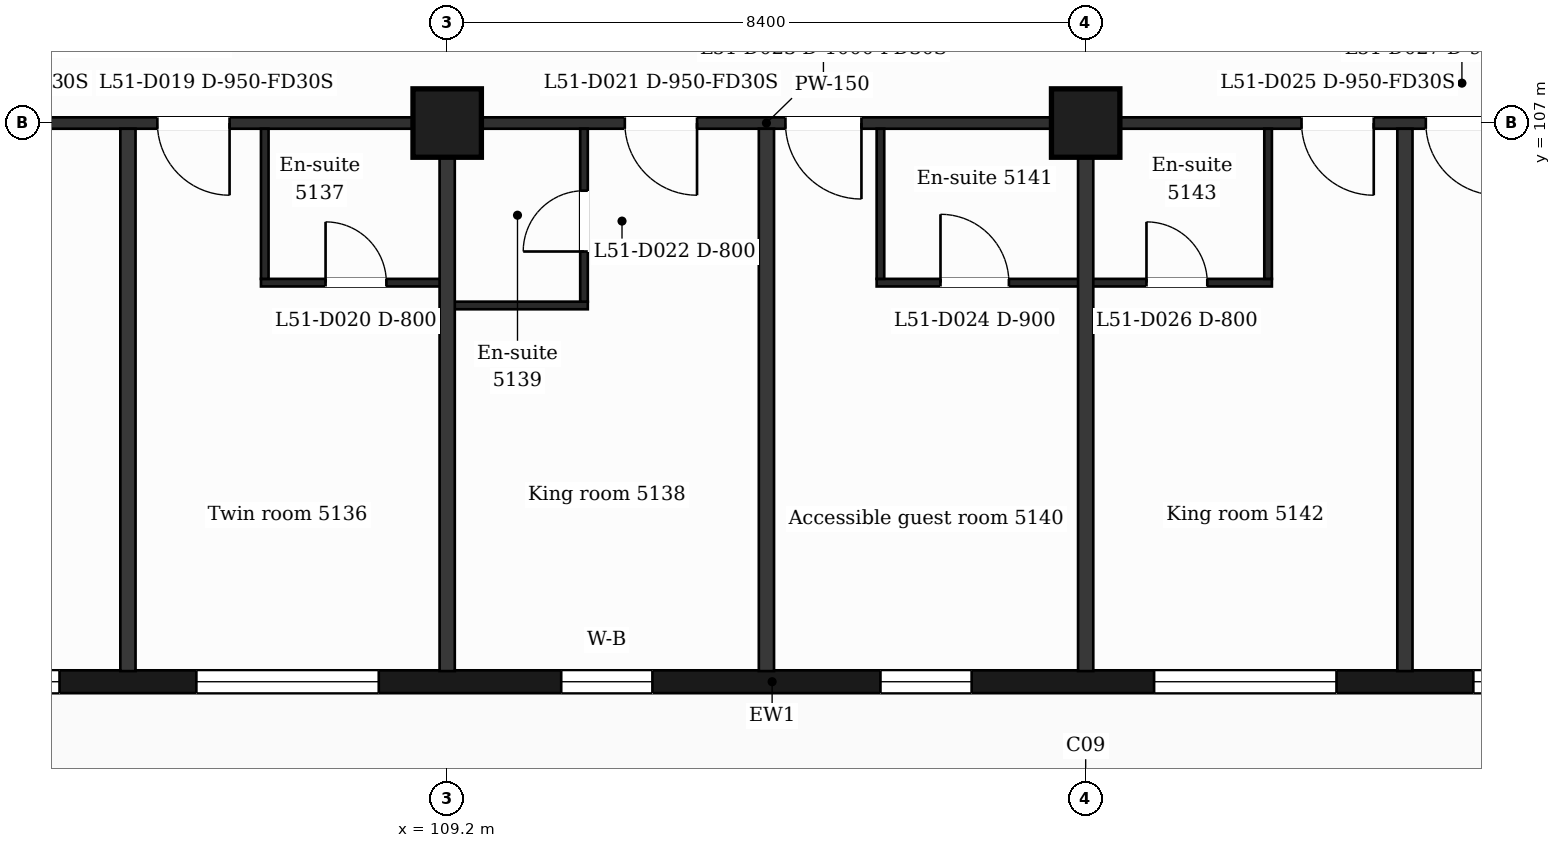
"""IFC4 building model, lengths in metres.
Left out: names, types, materials, properties, quantities, classifications, styles, units other than length and angle.
Written with IfcOpenShell. Run it as: python <this file> out.ifc"""

import sys

from ifc_helpers import new_model, si_unit, direction, frame, frame_2d, origin, origin_2d, place, context, subcontext, project, spatial, rectangle, extrude, element, fill, save


model = new_model("IFC4")
c1 = context("Model", 3, precision=1e-05, world=origin(), true_north=direction((0.0, 1.0)))
c2 = subcontext(c1, "Body", "Model", "MODEL_VIEW")
j1 = project(units=[si_unit("LENGTHUNIT", "METRE"), si_unit("PLANEANGLEUNIT", "RADIAN")], contexts=[c1])
p1 = place(None, origin())
s1 = spatial("IfcSite", under=j1, at=p1, CompositionType="ELEMENT")
p2 = place(p1, origin())
s2 = spatial("IfcBuilding", under=s1, at=p2, CompositionType="ELEMENT")
p3 = place(p2, frame((0.0, 0.0, 213.3)))
s3 = spatial("IfcBuildingStorey", under=s2, at=p3, CompositionType="ELEMENT", Elevation=213.3)
for number, where, z_axis, x_axis in (
    (1, (109.2, 107.0, 0.0), (0.0, 0.0, 1.0), (1.0, 0.0, 0.0)),
    (2, (117.6, 107.0, 0.0), (0.0, 0.0, 1.0), (1.0, 0.0, 0.0)),
):
    element("IfcColumn", number, at=place(p3, frame(where, z_axis=z_axis, x_axis=x_axis)), inside=s3, PredefinedType="COLUMN", context=c2, shape_type="SweptSolid", body=[
        extrude(rectangle(XDim=0.9, YDim=0.9, at=origin_2d()), origin(), (0.0, 0.0, 1.0), 3.7),
    ])
p4 = place(p3, frame((89.85, 99.65, 0.0), z_axis=(0.0, 0.0, 1.0), x_axis=(1.0, 0.0, 0.0)))
e3 = element("IfcWall", 3, at=p4, inside=s3, PredefinedType="SOLIDWALL", context=c2, shape_type="SweptSolid", body=[
    extrude(rectangle(XDim=47.25, YDim=0.3, at=frame_2d((23.625, 0.0))), origin(), (0.0, 0.0, 1.0), 3.38),
])
p5 = place(p4, frame((0.725, 0.0, 0.9)))
e4 = element("IfcOpeningElement", 4, at=p5, cuts=e3, PredefinedType="OPENING", context=c2, shape_type="SweptSolid", body=[
    extrude(rectangle(XDim=1.2, YDim=2.1, at=frame_2d((0.6, 1.05))), frame((0.0, 0.16, 0.0), z_axis=(0.0, -1.0, 0.0), x_axis=(1.0, 0.0, 0.0)), (0.0, 0.0, 1.0), 0.32),
])
p6 = place(p4, frame((3.45, 0.0, 0.9)))
e5 = element("IfcOpeningElement", 5, at=p6, cuts=e3, PredefinedType="OPENING", context=c2, shape_type="SweptSolid", body=[
    extrude(rectangle(XDim=2.4, YDim=2.1, at=frame_2d((1.2, 1.05))), frame((0.0, 0.16, 0.0), z_axis=(0.0, -1.0, 0.0), x_axis=(1.0, 0.0, 0.0)), (0.0, 0.0, 1.0), 0.32),
])
p7 = place(p4, frame((7.35, 0.0, 0.0)))
e6 = element("IfcOpeningElement", 6, at=p7, cuts=e3, PredefinedType="OPENING", context=c2, shape_type="SweptSolid", body=[
    extrude(rectangle(XDim=1.2, YDim=2.4, at=frame_2d((0.6, 1.2))), frame((0.0, 0.16, 0.0), z_axis=(0.0, -1.0, 0.0), x_axis=(1.0, 0.0, 0.0)), (0.0, 0.0, 1.0), 0.32),
])
p8 = place(p4, frame((9.15, 0.0, 0.9)))
e7 = element("IfcOpeningElement", 7, at=p8, cuts=e3, PredefinedType="OPENING", context=c2, shape_type="SweptSolid", body=[
    extrude(rectangle(XDim=1.2, YDim=2.1, at=frame_2d((0.6, 1.05))), frame((0.0, 0.16, 0.0), z_axis=(0.0, -1.0, 0.0), x_axis=(1.0, 0.0, 0.0)), (0.0, 0.0, 1.0), 0.32),
])
p9 = place(p4, frame((11.85, 0.0, 0.9)))
e8 = element("IfcOpeningElement", 8, at=p9, cuts=e3, PredefinedType="OPENING", context=c2, shape_type="SweptSolid", body=[
    extrude(rectangle(XDim=2.4, YDim=2.1, at=frame_2d((1.2, 1.05))), frame((0.0, 0.16, 0.0), z_axis=(0.0, -1.0, 0.0), x_axis=(1.0, 0.0, 0.0)), (0.0, 0.0, 1.0), 0.32),
])
p10 = place(p4, frame((16.05, 0.0, 0.9)))
e9 = element("IfcOpeningElement", 9, at=p10, cuts=e3, PredefinedType="OPENING", context=c2, shape_type="SweptSolid", body=[
    extrude(rectangle(XDim=2.4, YDim=2.1, at=frame_2d((1.2, 1.05))), frame((0.0, 0.16, 0.0), z_axis=(0.0, -1.0, 0.0), x_axis=(1.0, 0.0, 0.0)), (0.0, 0.0, 1.0), 0.32),
])
p11 = place(p4, frame((20.85, 0.0, 0.9)))
e10 = element("IfcOpeningElement", 10, at=p11, cuts=e3, PredefinedType="OPENING", context=c2, shape_type="SweptSolid", body=[
    extrude(rectangle(XDim=1.2, YDim=2.1, at=frame_2d((0.6, 1.05))), frame((0.0, 0.16, 0.0), z_axis=(0.0, -1.0, 0.0), x_axis=(1.0, 0.0, 0.0)), (0.0, 0.0, 1.0), 0.32),
])
p12 = place(p4, frame((25.05, 0.0, 0.9)))
e11 = element("IfcOpeningElement", 11, at=p12, cuts=e3, PredefinedType="OPENING", context=c2, shape_type="SweptSolid", body=[
    extrude(rectangle(XDim=1.2, YDim=2.1, at=frame_2d((0.6, 1.05))), frame((0.0, 0.16, 0.0), z_axis=(0.0, -1.0, 0.0), x_axis=(1.0, 0.0, 0.0)), (0.0, 0.0, 1.0), 0.32),
])
p13 = place(p4, frame((28.65, 0.0, 0.9)))
e12 = element("IfcOpeningElement", 12, at=p13, cuts=e3, PredefinedType="OPENING", context=c2, shape_type="SweptSolid", body=[
    extrude(rectangle(XDim=2.4, YDim=2.1, at=frame_2d((1.2, 1.05))), frame((0.0, 0.16, 0.0), z_axis=(0.0, -1.0, 0.0), x_axis=(1.0, 0.0, 0.0)), (0.0, 0.0, 1.0), 0.32),
])
p14 = place(p4, frame((32.85, 0.0, 0.9)))
e13 = element("IfcOpeningElement", 13, at=p14, cuts=e3, PredefinedType="OPENING", context=c2, shape_type="SweptSolid", body=[
    extrude(rectangle(XDim=2.4, YDim=2.1, at=frame_2d((1.2, 1.05))), frame((0.0, 0.16, 0.0), z_axis=(0.0, -1.0, 0.0), x_axis=(1.0, 0.0, 0.0)), (0.0, 0.0, 1.0), 0.32),
])
p15 = place(p4, frame((37.05, 0.0, 0.9)))
e14 = element("IfcOpeningElement", 14, at=p15, cuts=e3, PredefinedType="OPENING", context=c2, shape_type="SweptSolid", body=[
    extrude(rectangle(XDim=2.4, YDim=2.1, at=frame_2d((1.2, 1.05))), frame((0.0, 0.16, 0.0), z_axis=(0.0, -1.0, 0.0), x_axis=(1.0, 0.0, 0.0)), (0.0, 0.0, 1.0), 0.32),
])
p16 = place(p4, frame((41.25, 0.0, 0.9)))
e15 = element("IfcOpeningElement", 15, at=p16, cuts=e3, PredefinedType="OPENING", context=c2, shape_type="SweptSolid", body=[
    extrude(rectangle(XDim=2.4, YDim=2.1, at=frame_2d((1.2, 1.05))), frame((0.0, 0.16, 0.0), z_axis=(0.0, -1.0, 0.0), x_axis=(1.0, 0.0, 0.0)), (0.0, 0.0, 1.0), 0.32),
])
p17 = place(p4, frame((45.25, 0.0, 0.9)))
e16 = element("IfcOpeningElement", 16, at=p17, cuts=e3, PredefinedType="OPENING", context=c2, shape_type="SweptSolid", body=[
    extrude(rectangle(XDim=1.2, YDim=2.1, at=frame_2d((0.6, 1.05))), frame((0.0, 0.16, 0.0), z_axis=(0.0, -1.0, 0.0), x_axis=(1.0, 0.0, 0.0)), (0.0, 0.0, 1.0), 0.32),
])
p18 = place(p3, frame((109.2, 104.6, 0.0), z_axis=(0.0, 0.0, 1.0), x_axis=(1.0, 0.0, 0.0)))
e17 = element("IfcWall", 17, at=p18, inside=s3, PredefinedType="PARTITIONING", context=c2, shape_type="SweptSolid", body=[
    extrude(rectangle(XDim=1.85, YDim=0.1, at=frame_2d((0.925, 0.0))), origin(), (0.0, 0.0, 1.0), 3.38),
])
p19 = place(p3, frame((106.75, 104.9, 0.0), z_axis=(0.0, 0.0, 1.0), x_axis=(1.0, 0.0, 0.0)))
e18 = element("IfcWall", 18, at=p19, inside=s3, PredefinedType="PARTITIONING", context=c2, shape_type="SweptSolid", body=[
    extrude(rectangle(XDim=2.45, YDim=0.1, at=frame_2d((1.225, 0.0))), origin(), (0.0, 0.0, 1.0), 3.38),
])
p20 = place(p19, frame((0.85, 0.0, 0.0)))
e19 = element("IfcOpeningElement", 19, at=p20, cuts=e18, PredefinedType="OPENING", context=c2, shape_type="SweptSolid", body=[
    extrude(rectangle(XDim=0.8, YDim=2.1, at=frame_2d((0.4, 1.05))), frame((0.0, 0.06, 0.0), z_axis=(0.0, -1.0, 0.0), x_axis=(1.0, 0.0, 0.0)), (0.0, 0.0, 1.0), 0.12),
])
p21 = place(p3, frame((114.85, 104.9, 0.0), z_axis=(0.0, 0.0, 1.0), x_axis=(1.0, 0.0, 0.0)))
e20 = element("IfcWall", 20, at=p21, inside=s3, PredefinedType="PARTITIONING", context=c2, shape_type="SweptSolid", body=[
    extrude(rectangle(XDim=5.2, YDim=0.1, at=frame_2d((2.6, 0.0))), origin(), (0.0, 0.0, 1.0), 3.38),
])
p22 = place(p21, frame((0.84, 0.0, 0.0)))
e21 = element("IfcOpeningElement", 21, at=p22, cuts=e20, PredefinedType="OPENING", context=c2, shape_type="SweptSolid", body=[
    extrude(rectangle(XDim=0.9, YDim=2.1, at=frame_2d((0.45, 1.05))), frame((0.0, 0.06, 0.0), z_axis=(0.0, -1.0, 0.0), x_axis=(1.0, 0.0, 0.0)), (0.0, 0.0, 1.0), 0.12),
])
p23 = place(p21, frame((3.55, 0.0, 0.0)))
e22 = element("IfcOpeningElement", 22, at=p23, cuts=e20, PredefinedType="OPENING", context=c2, shape_type="SweptSolid", body=[
    extrude(rectangle(XDim=0.8, YDim=2.1, at=frame_2d((0.4, 1.05))), frame((0.0, 0.06, 0.0), z_axis=(0.0, -1.0, 0.0), x_axis=(1.0, 0.0, 0.0)), (0.0, 0.0, 1.0), 0.12),
])
p24 = place(p3, frame((87.018, 107.0, 0.0), z_axis=(0.0, 0.0, 1.0), x_axis=(1.0, 0.0, 0.0)))
e23 = element("IfcWall", 23, at=p24, inside=s3, PredefinedType="PARTITIONING", context=c2, shape_type="SweptSolid", body=[
    extrude(rectangle(XDim=52.765, YDim=0.15, at=frame_2d((26.382, 0.0))), origin(), (0.0, 0.0, 1.0), 3.38),
])
p25 = place(p24, frame((1.276, 0.0, 0.0)))
e24 = element("IfcOpeningElement", 24, at=p25, cuts=e23, PredefinedType="OPENING", context=c2, shape_type="SweptSolid", body=[
    extrude(rectangle(XDim=0.95, YDim=2.1, at=frame_2d((0.475, 1.05))), frame((0.0, 0.085, 0.0), z_axis=(0.0, -1.0, 0.0), x_axis=(1.0, 0.0, 0.0)), (0.0, 0.0, 1.0), 0.17),
])
p26 = place(p24, frame((6.034, 0.0, 0.0)))
e25 = element("IfcOpeningElement", 25, at=p26, cuts=e23, PredefinedType="OPENING", context=c2, shape_type="SweptSolid", body=[
    extrude(rectangle(XDim=0.95, YDim=2.1, at=frame_2d((0.475, 1.05))), frame((0.0, 0.085, 0.0), z_axis=(0.0, -1.0, 0.0), x_axis=(1.0, 0.0, 0.0)), (0.0, 0.0, 1.0), 0.17),
])
p27 = place(p24, frame((15.445, 0.0, 0.0)))
e26 = element("IfcOpeningElement", 26, at=p27, cuts=e23, PredefinedType="OPENING", context=c2, shape_type="SweptSolid", body=[
    extrude(rectangle(XDim=0.95, YDim=2.1, at=frame_2d((0.475, 1.05))), frame((0.0, 0.085, 0.0), z_axis=(0.0, -1.0, 0.0), x_axis=(1.0, 0.0, 0.0)), (0.0, 0.0, 1.0), 0.17),
])
p28 = place(p24, frame((18.369, 0.0, 0.0)))
e27 = element("IfcOpeningElement", 27, at=p28, cuts=e23, PredefinedType="OPENING", context=c2, shape_type="SweptSolid", body=[
    extrude(rectangle(XDim=0.95, YDim=2.1, at=frame_2d((0.475, 1.05))), frame((0.0, 0.085, 0.0), z_axis=(0.0, -1.0, 0.0), x_axis=(1.0, 0.0, 0.0)), (0.0, 0.0, 1.0), 0.17),
])
p29 = place(p24, frame((24.519, 0.0, 0.0)))
e28 = element("IfcOpeningElement", 28, at=p29, cuts=e23, PredefinedType="OPENING", context=c2, shape_type="SweptSolid", body=[
    extrude(rectangle(XDim=0.95, YDim=2.1, at=frame_2d((0.475, 1.05))), frame((0.0, 0.085, 0.0), z_axis=(0.0, -1.0, 0.0), x_axis=(1.0, 0.0, 0.0)), (0.0, 0.0, 1.0), 0.17),
])
p30 = place(p24, frame((26.632, 0.0, 0.0)))
e29 = element("IfcOpeningElement", 29, at=p30, cuts=e23, PredefinedType="OPENING", context=c2, shape_type="SweptSolid", body=[
    extrude(rectangle(XDim=1.0, YDim=2.1, at=frame_2d((0.5, 1.05))), frame((0.0, 0.085, 0.0), z_axis=(0.0, -1.0, 0.0), x_axis=(1.0, 0.0, 0.0)), (0.0, 0.0, 1.0), 0.17),
])
p31 = place(p24, frame((33.422, 0.0, 0.0)))
e30 = element("IfcOpeningElement", 30, at=p31, cuts=e23, PredefinedType="OPENING", context=c2, shape_type="SweptSolid", body=[
    extrude(rectangle(XDim=0.95, YDim=2.1, at=frame_2d((0.475, 1.05))), frame((0.0, 0.085, 0.0), z_axis=(0.0, -1.0, 0.0), x_axis=(1.0, 0.0, 0.0)), (0.0, 0.0, 1.0), 0.17),
])
p32 = place(p24, frame((35.057, 0.0, 0.0)))
e31 = element("IfcOpeningElement", 31, at=p32, cuts=e23, PredefinedType="OPENING", context=c2, shape_type="SweptSolid", body=[
    extrude(rectangle(XDim=0.95, YDim=2.1, at=frame_2d((0.475, 1.05))), frame((0.0, 0.085, 0.0), z_axis=(0.0, -1.0, 0.0), x_axis=(1.0, 0.0, 0.0)), (0.0, 0.0, 1.0), 0.17),
])
p33 = place(p24, frame((44.532, 0.0, 0.0)))
e32 = element("IfcOpeningElement", 32, at=p33, cuts=e23, PredefinedType="OPENING", context=c2, shape_type="SweptSolid", body=[
    extrude(rectangle(XDim=1.0, YDim=2.1, at=frame_2d((0.5, 1.05))), frame((0.0, 0.085, 0.0), z_axis=(0.0, -1.0, 0.0), x_axis=(1.0, 0.0, 0.0)), (0.0, 0.0, 1.0), 0.17),
])
p34 = place(p24, frame((48.249, 0.0, 0.0)))
e33 = element("IfcOpeningElement", 33, at=p34, cuts=e23, PredefinedType="OPENING", context=c2, shape_type="SweptSolid", body=[
    extrude(rectangle(XDim=0.95, YDim=2.1, at=frame_2d((0.475, 1.05))), frame((0.0, 0.085, 0.0), z_axis=(0.0, -1.0, 0.0), x_axis=(1.0, 0.0, 0.0)), (0.0, 0.0, 1.0), 0.17),
])
p35 = place(p3, frame((105.0, 99.79, 0.0), z_axis=(0.0, 0.0, 1.0), x_axis=(0.0, 1.0, 0.0)))
e34 = element("IfcWall", 34, at=p35, inside=s3, PredefinedType="PARTITIONING", context=c2, shape_type="SweptSolid", body=[
    extrude(rectangle(XDim=7.135, YDim=0.2, at=frame_2d((3.567, 0.0))), origin(), (0.0, 0.0, 1.0), 3.38),
])
p36 = place(p3, frame((106.8, 104.95, 0.0), z_axis=(0.0, 0.0, 1.0), x_axis=(0.0, 1.0, 0.0)))
e35 = element("IfcWall", 35, at=p36, inside=s3, PredefinedType="PARTITIONING", context=c2, shape_type="SweptSolid", body=[
    extrude(rectangle(XDim=1.975, YDim=0.1, at=frame_2d((0.988, 0.0))), origin(), (0.0, 0.0, 1.0), 3.38),
])
p37 = place(p3, frame((109.2, 99.79, 0.0), z_axis=(0.0, 0.0, 1.0), x_axis=(0.0, 1.0, 0.0)))
e36 = element("IfcWall", 36, at=p37, inside=s3, PredefinedType="PARTITIONING", context=c2, shape_type="SweptSolid", body=[
    extrude(rectangle(XDim=7.135, YDim=0.2, at=frame_2d((3.567, 0.0))), origin(), (0.0, 0.0, 1.0), 3.38),
])
p38 = place(p3, frame((111.0, 104.65, 0.0), z_axis=(0.0, 0.0, 1.0), x_axis=(0.0, 1.0, 0.0)))
e37 = element("IfcWall", 37, at=p38, inside=s3, PredefinedType="PARTITIONING", context=c2, shape_type="SweptSolid", body=[
    extrude(rectangle(XDim=2.275, YDim=0.1, at=frame_2d((1.138, 0.0))), origin(), (0.0, 0.0, 1.0), 3.38),
])
p39 = place(p38, frame((0.66, 0.0, 0.0)))
e38 = element("IfcOpeningElement", 38, at=p39, cuts=e37, PredefinedType="OPENING", context=c2, shape_type="SweptSolid", body=[
    extrude(rectangle(XDim=0.8, YDim=2.1, at=frame_2d((0.4, 1.05))), frame((0.0, 0.06, 0.0), z_axis=(0.0, -1.0, 0.0), x_axis=(1.0, 0.0, 0.0)), (0.0, 0.0, 1.0), 0.12),
])
p40 = place(p3, frame((113.4, 99.79, 0.0), z_axis=(0.0, 0.0, 1.0), x_axis=(0.0, 1.0, 0.0)))
e39 = element("IfcWall", 39, at=p40, inside=s3, PredefinedType="PARTITIONING", context=c2, shape_type="SweptSolid", body=[
    extrude(rectangle(XDim=7.135, YDim=0.2, at=frame_2d((3.567, 0.0))), origin(), (0.0, 0.0, 1.0), 3.38),
])
p41 = place(p3, frame((114.9, 104.95, 0.0), z_axis=(0.0, 0.0, 1.0), x_axis=(0.0, 1.0, 0.0)))
e40 = element("IfcWall", 40, at=p41, inside=s3, PredefinedType="PARTITIONING", context=c2, shape_type="SweptSolid", body=[
    extrude(rectangle(XDim=1.975, YDim=0.1, at=frame_2d((0.988, 0.0))), origin(), (0.0, 0.0, 1.0), 3.38),
])
p42 = place(p3, frame((117.6, 99.79, 0.0), z_axis=(0.0, 0.0, 1.0), x_axis=(0.0, 1.0, 0.0)))
e41 = element("IfcWall", 41, at=p42, inside=s3, PredefinedType="PARTITIONING", context=c2, shape_type="SweptSolid", body=[
    extrude(rectangle(XDim=7.135, YDim=0.2, at=frame_2d((3.567, 0.0))), origin(), (0.0, 0.0, 1.0), 3.38),
])
p43 = place(p3, frame((120.0, 104.95, 0.0), z_axis=(0.0, 0.0, 1.0), x_axis=(0.0, 1.0, 0.0)))
e42 = element("IfcWall", 42, at=p43, inside=s3, PredefinedType="PARTITIONING", context=c2, shape_type="SweptSolid", body=[
    extrude(rectangle(XDim=1.975, YDim=0.1, at=frame_2d((0.988, 0.0))), origin(), (0.0, 0.0, 1.0), 3.38),
])
p44 = place(p3, frame((121.8, 99.79, 0.0), z_axis=(0.0, 0.0, 1.0), x_axis=(0.0, 1.0, 0.0)))
e43 = element("IfcWall", 43, at=p44, inside=s3, PredefinedType="PARTITIONING", context=c2, shape_type="SweptSolid", body=[
    extrude(rectangle(XDim=7.135, YDim=0.2, at=frame_2d((3.567, 0.0))), origin(), (0.0, 0.0, 1.0), 3.38),
])
p45 = place(p9, origin())
e44 = element("IfcWindow", 44, at=p45, inside=s3, PartitioningType="SINGLE_PANEL", PredefinedType="WINDOW", context=c2, shape_type="SweptSolid", body=[
    extrude(rectangle(XDim=2.4, YDim=2.1, at=frame_2d((1.2, 1.05))), frame((0.0, 0.03, 0.0), z_axis=(0.0, -1.0, 0.0), x_axis=(1.0, 0.0, 0.0)), (0.0, 0.0, 1.0), 0.06),
])
fill(e8, e44)
p46 = place(p10, origin())
e45 = element("IfcWindow", 45, at=p46, inside=s3, PartitioningType="SINGLE_PANEL", PredefinedType="WINDOW", context=c2, shape_type="SweptSolid", body=[
    extrude(rectangle(XDim=2.4, YDim=2.1, at=frame_2d((1.2, 1.05))), frame((0.0, 0.03, 0.0), z_axis=(0.0, -1.0, 0.0), x_axis=(1.0, 0.0, 0.0)), (0.0, 0.0, 1.0), 0.06),
])
fill(e9, e45)
p47 = place(p11, origin())
e46 = element("IfcWindow", 46, at=p47, inside=s3, PartitioningType="SINGLE_PANEL", PredefinedType="WINDOW", context=c2, shape_type="SweptSolid", body=[
    extrude(rectangle(XDim=1.2, YDim=2.1, at=frame_2d((0.6, 1.05))), frame((0.0, 0.03, 0.0), z_axis=(0.0, -1.0, 0.0), x_axis=(1.0, 0.0, 0.0)), (0.0, 0.0, 1.0), 0.06),
])
fill(e10, e46)
p48 = place(p12, origin())
e47 = element("IfcWindow", 47, at=p48, inside=s3, PartitioningType="SINGLE_PANEL", PredefinedType="WINDOW", context=c2, shape_type="SweptSolid", body=[
    extrude(rectangle(XDim=1.2, YDim=2.1, at=frame_2d((0.6, 1.05))), frame((0.0, 0.03, 0.0), z_axis=(0.0, -1.0, 0.0), x_axis=(1.0, 0.0, 0.0)), (0.0, 0.0, 1.0), 0.06),
])
fill(e11, e47)
p49 = place(p13, origin())
e48 = element("IfcWindow", 48, at=p49, inside=s3, PartitioningType="SINGLE_PANEL", PredefinedType="WINDOW", context=c2, shape_type="SweptSolid", body=[
    extrude(rectangle(XDim=2.4, YDim=2.1, at=frame_2d((1.2, 1.05))), frame((0.0, 0.03, 0.0), z_axis=(0.0, -1.0, 0.0), x_axis=(1.0, 0.0, 0.0)), (0.0, 0.0, 1.0), 0.06),
])
fill(e12, e48)
p50 = place(p14, origin())
e49 = element("IfcWindow", 49, at=p50, inside=s3, PartitioningType="SINGLE_PANEL", PredefinedType="WINDOW", context=c2, shape_type="SweptSolid", body=[
    extrude(rectangle(XDim=2.4, YDim=2.1, at=frame_2d((1.2, 1.05))), frame((0.0, 0.03, 0.0), z_axis=(0.0, -1.0, 0.0), x_axis=(1.0, 0.0, 0.0)), (0.0, 0.0, 1.0), 0.06),
])
fill(e13, e49)
p51 = place(p28, origin())
e50 = element("IfcDoor", 50, at=p51, inside=s3, OperationType="SINGLE_SWING_RIGHT", PredefinedType="DOOR", context=c2, shape_type="SweptSolid", body=[
    extrude(rectangle(XDim=0.95, YDim=2.1, at=frame_2d((0.475, 1.05))), frame((0.0, 0.025, 0.0), z_axis=(0.0, -1.0, 0.0), x_axis=(1.0, 0.0, 0.0)), (0.0, 0.0, 1.0), 0.05),
])
fill(e27, e50)
p52 = place(p20, origin())
e51 = element("IfcDoor", 51, at=p52, inside=s3, OperationType="SINGLE_SWING_LEFT", PredefinedType="DOOR", context=c2, shape_type="SweptSolid", body=[
    extrude(rectangle(XDim=0.8, YDim=2.1, at=frame_2d((0.4, 1.05))), frame((0.0, 0.025, 0.0), z_axis=(0.0, -1.0, 0.0), x_axis=(1.0, 0.0, 0.0)), (0.0, 0.0, 1.0), 0.05),
])
fill(e19, e51)
p53 = place(p29, origin())
e52 = element("IfcDoor", 52, at=p53, inside=s3, OperationType="SINGLE_SWING_RIGHT", PredefinedType="DOOR", context=c2, shape_type="SweptSolid", body=[
    extrude(rectangle(XDim=0.95, YDim=2.1, at=frame_2d((0.475, 1.05))), frame((0.0, 0.025, 0.0), z_axis=(0.0, -1.0, 0.0), x_axis=(1.0, 0.0, 0.0)), (0.0, 0.0, 1.0), 0.05),
])
fill(e28, e52)
p54 = place(p39, origin())
e53 = element("IfcDoor", 53, at=p54, inside=s3, OperationType="SINGLE_SWING_LEFT", PredefinedType="DOOR", context=c2, shape_type="SweptSolid", body=[
    extrude(rectangle(XDim=0.8, YDim=2.1, at=frame_2d((0.4, 1.05))), frame((0.0, 0.025, 0.0), z_axis=(0.0, -1.0, 0.0), x_axis=(1.0, 0.0, 0.0)), (0.0, 0.0, 1.0), 0.05),
])
fill(e38, e53)
p55 = place(p30, origin())
e54 = element("IfcDoor", 54, at=p55, inside=s3, OperationType="SINGLE_SWING_RIGHT", PredefinedType="DOOR", context=c2, shape_type="SweptSolid", body=[
    extrude(rectangle(XDim=1.0, YDim=2.1, at=frame_2d((0.5, 1.05))), frame((0.0, 0.025, 0.0), z_axis=(0.0, -1.0, 0.0), x_axis=(1.0, 0.0, 0.0)), (0.0, 0.0, 1.0), 0.05),
])
fill(e29, e54)
p56 = place(p22, origin())
e55 = element("IfcDoor", 55, at=p56, inside=s3, OperationType="SINGLE_SWING_LEFT", PredefinedType="DOOR", context=c2, shape_type="SweptSolid", body=[
    extrude(rectangle(XDim=0.9, YDim=2.1, at=frame_2d((0.45, 1.05))), frame((0.0, 0.025, 0.0), z_axis=(0.0, -1.0, 0.0), x_axis=(1.0, 0.0, 0.0)), (0.0, 0.0, 1.0), 0.05),
])
fill(e21, e55)
p57 = place(p31, origin())
e56 = element("IfcDoor", 56, at=p57, inside=s3, OperationType="SINGLE_SWING_RIGHT", PredefinedType="DOOR", context=c2, shape_type="SweptSolid", body=[
    extrude(rectangle(XDim=0.95, YDim=2.1, at=frame_2d((0.475, 1.05))), frame((0.0, 0.025, 0.0), z_axis=(0.0, -1.0, 0.0), x_axis=(1.0, 0.0, 0.0)), (0.0, 0.0, 1.0), 0.05),
])
fill(e30, e56)
p58 = place(p23, origin())
e57 = element("IfcDoor", 57, at=p58, inside=s3, OperationType="SINGLE_SWING_LEFT", PredefinedType="DOOR", context=c2, shape_type="SweptSolid", body=[
    extrude(rectangle(XDim=0.8, YDim=2.1, at=frame_2d((0.4, 1.05))), frame((0.0, 0.025, 0.0), z_axis=(0.0, -1.0, 0.0), x_axis=(1.0, 0.0, 0.0)), (0.0, 0.0, 1.0), 0.05),
])
fill(e22, e57)
p59 = place(p32, origin())
e58 = element("IfcDoor", 58, at=p59, inside=s3, OperationType="SINGLE_SWING_RIGHT", PredefinedType="DOOR", context=c2, shape_type="SweptSolid", body=[
    extrude(rectangle(XDim=0.95, YDim=2.1, at=frame_2d((0.475, 1.05))), frame((0.0, 0.025, 0.0), z_axis=(0.0, -1.0, 0.0), x_axis=(1.0, 0.0, 0.0)), (0.0, 0.0, 1.0), 0.05),
])
fill(e31, e58)
save(model, sys.argv[1])
